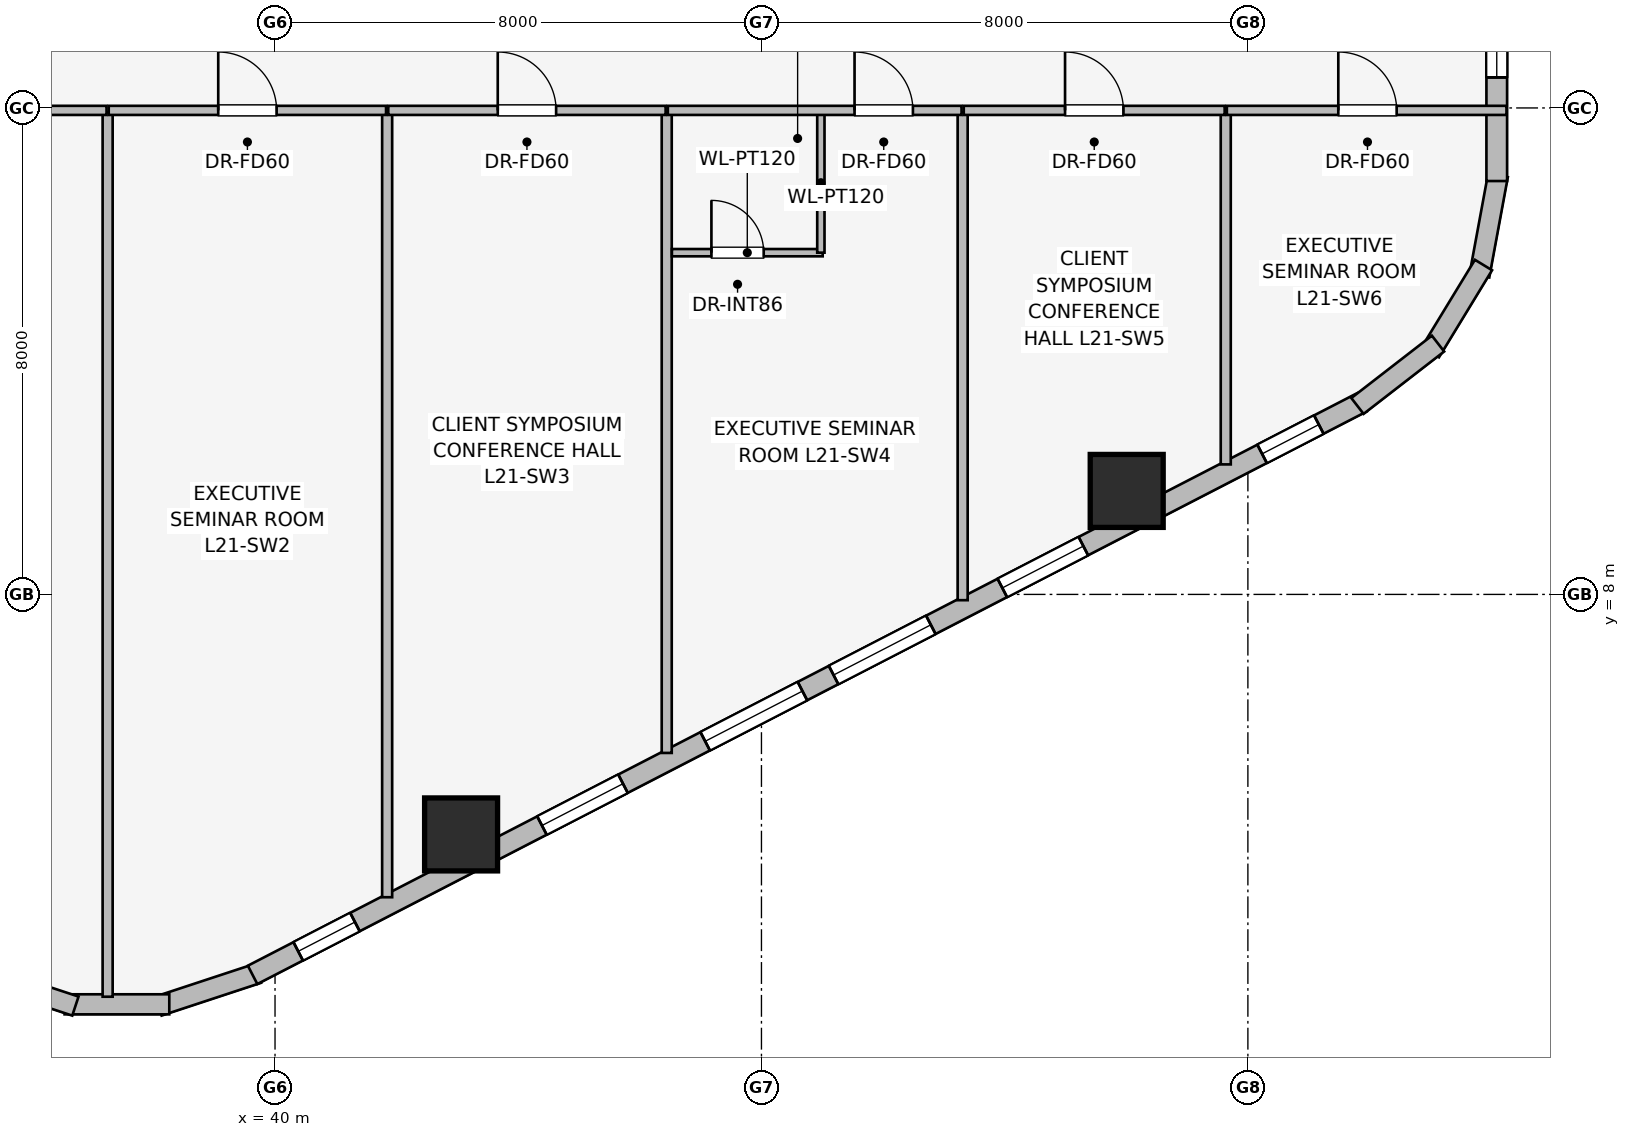
"""IFC4 building model, lengths in metres.
Left out: names, types, materials, properties, quantities, classifications, styles, units other than length and angle.
Written with IfcOpenShell. Run it as: python <this file> out.ifc"""

import sys

from ifc_helpers import new_model, si_unit, direction, frame, frame_2d, origin, origin_2d, place, context, subcontext, project, spatial, rectangle, extrude, element, fill, save


model = new_model("IFC4")
c1 = context("Model", 3, precision=1e-05, world=origin(), true_north=direction((0.0, 1.0)))
c2 = subcontext(c1, "Body", "Model", "MODEL_VIEW")
j1 = project(units=[si_unit("LENGTHUNIT", "METRE"), si_unit("PLANEANGLEUNIT", "RADIAN")], contexts=[c1])
p1 = place(None, origin())
s1 = spatial("IfcSite", under=j1, at=p1, CompositionType="ELEMENT")
p2 = place(p1, origin())
s2 = spatial("IfcBuilding", under=s1, at=p2, CompositionType="ELEMENT")
p3 = place(p2, frame((0.0, 0.0, 81.75)))
s3 = spatial("IfcBuildingStorey", under=s2, at=p3, CompositionType="ELEMENT", Elevation=81.75)
for number, where, z_axis, x_axis in (
    (1, (43.06, 4.053, 0.0), (0.0, 0.0, 1.0), (1.0, 0.0, 0.0)),
    (2, (54.007, 9.702, 0.0), (0.0, 0.0, 1.0), (1.0, 0.0, 0.0)),
):
    element("IfcColumn", number, at=place(p3, frame(where, z_axis=z_axis, x_axis=x_axis)), inside=s3, PredefinedType="COLUMN", context=c2, shape_type="SweptSolid", body=[
        extrude(rectangle(XDim=1.2, YDim=1.2, at=origin_2d()), origin(), (0.0, 0.0, 1.0), 3.65),
    ])
p4 = place(p3, frame((39.719, 1.769, 0.0), z_axis=(0.0, 0.0, 1.0), x_axis=(-0.94976901097, -0.312951794691, 0.0)))
e3 = element("IfcWall", 3, at=p4, inside=s3, PredefinedType="STANDARD", context=c2, shape_type="SweptSolid", body=[
    extrude(rectangle(XDim=1.722, YDim=0.33, at=frame_2d((0.861, 0.0))), origin(), (0.0, 0.0, 1.0), 3.39),
])
p5 = place(p3, frame((38.261, 1.259, 0.0), z_axis=(0.0, 0.0, 1.0), x_axis=(-1.0, 0.0, 0.0)))
e4 = element("IfcWall", 4, at=p5, inside=s3, PredefinedType="STANDARD", context=c2, shape_type="SweptSolid", body=[
    extrude(rectangle(XDim=1.722, YDim=0.33, at=frame_2d((0.861, 0.0))), origin(), (0.0, 0.0, 1.0), 3.39),
])
p6 = place(p3, frame((36.717, 1.23, 0.0), z_axis=(0.0, 0.0, 1.0), x_axis=(-0.94976901097, 0.312951794691, 0.0)))
e5 = element("IfcWall", 5, at=p6, inside=s3, PredefinedType="STANDARD", context=c2, shape_type="SweptSolid", body=[
    extrude(rectangle(XDim=1.722, YDim=0.33, at=frame_2d((0.861, 0.0))), origin(), (0.0, 0.0, 1.0), 3.39),
])
p7 = place(p3, frame((57.876, 11.159, 0.0), z_axis=(0.0, 0.0, 1.0), x_axis=(-0.888634413993, -0.458616264721, 0.0)))
e6 = element("IfcWall", 6, at=p7, inside=s3, PredefinedType="STANDARD", context=c2, shape_type="SweptSolid", body=[
    extrude(rectangle(XDim=20.531, YDim=0.34, at=frame_2d((10.266, 0.0))), origin(), (0.0, 0.0, 1.0), 2.684),
])
p8 = place(p7, frame((0.798, 0.0, 0.75)))
e7 = element("IfcOpeningElement", 7, at=p8, cuts=e6, PredefinedType="OPENING", context=c2, shape_type="SweptSolid", body=[
    extrude(rectangle(XDim=1.05, YDim=1.4, at=frame_2d((0.525, 0.7))), frame((0.0, 0.18, 0.0), z_axis=(0.0, -1.0, 0.0), x_axis=(1.0, 0.0, 0.0)), (0.0, 0.0, 1.0), 0.36),
])
p9 = place(p7, frame((5.156, 0.0, 0.75)))
e8 = element("IfcOpeningElement", 8, at=p9, cuts=e6, PredefinedType="OPENING", context=c2, shape_type="SweptSolid", body=[
    extrude(rectangle(XDim=1.5, YDim=1.5, at=frame_2d((0.75, 0.75))), frame((0.0, 0.18, 0.0), z_axis=(0.0, -1.0, 0.0), x_axis=(1.0, 0.0, 0.0)), (0.0, 0.0, 1.0), 0.36),
])
p10 = place(p7, frame((7.979, 0.0, 0.75)))
e9 = element("IfcOpeningElement", 9, at=p10, cuts=e6, PredefinedType="OPENING", context=c2, shape_type="SweptSolid", body=[
    extrude(rectangle(XDim=1.8, YDim=1.5, at=frame_2d((0.9, 0.75))), frame((0.0, 0.18, 0.0), z_axis=(0.0, -1.0, 0.0), x_axis=(1.0, 0.0, 0.0)), (0.0, 0.0, 1.0), 0.36),
])
p11 = place(p7, frame((10.355, 0.0, 0.75)))
e10 = element("IfcOpeningElement", 10, at=p11, cuts=e6, PredefinedType="OPENING", context=c2, shape_type="SweptSolid", body=[
    extrude(rectangle(XDim=1.8, YDim=1.5, at=frame_2d((0.9, 0.75))), frame((0.0, 0.18, 0.0), z_axis=(0.0, -1.0, 0.0), x_axis=(1.0, 0.0, 0.0)), (0.0, 0.0, 1.0), 0.36),
])
p12 = place(p7, frame((13.676, 0.0, 0.75)))
e11 = element("IfcOpeningElement", 11, at=p12, cuts=e6, PredefinedType="OPENING", context=c2, shape_type="SweptSolid", body=[
    extrude(rectangle(XDim=1.5, YDim=1.5, at=frame_2d((0.75, 0.75))), frame((0.0, 0.18, 0.0), z_axis=(0.0, -1.0, 0.0), x_axis=(1.0, 0.0, 0.0)), (0.0, 0.0, 1.0), 0.36),
])
p13 = place(p7, frame((18.637, 0.0, 0.75)))
e12 = element("IfcOpeningElement", 12, at=p13, cuts=e6, PredefinedType="OPENING", context=c2, shape_type="SweptSolid", body=[
    extrude(rectangle(XDim=1.05, YDim=1.4, at=frame_2d((0.525, 0.7))), frame((0.0, 0.18, 0.0), z_axis=(0.0, -1.0, 0.0), x_axis=(1.0, 0.0, 0.0)), (0.0, 0.0, 1.0), 0.36),
])
p14 = place(p3, frame((60.113, 14.892, 0.0), z_axis=(0.0, 0.0, 1.0), x_axis=(-0.181714143354, -0.983351397063, 0.0)))
e13 = element("IfcWall", 13, at=p14, inside=s3, PredefinedType="STANDARD", context=c2, shape_type="SweptSolid", body=[
    extrude(rectangle(XDim=1.678, YDim=0.33, at=frame_2d((0.839, 0.0))), origin(), (0.0, 0.0, 1.0), 3.39),
])
p15 = place(p3, frame((59.875, 13.417, 0.0), z_axis=(0.0, 0.0, 1.0), x_axis=(-0.520584129191, -0.853810379671, 0.0)))
e14 = element("IfcWall", 14, at=p15, inside=s3, PredefinedType="STANDARD", context=c2, shape_type="SweptSolid", body=[
    extrude(rectangle(XDim=1.677, YDim=0.33, at=frame_2d((0.838, 0.0))), origin(), (0.0, 0.0, 1.0), 3.39),
])
p16 = place(p3, frame((59.127, 12.125, 0.0), z_axis=(0.0, 0.0, 1.0), x_axis=(-0.790691856293, -0.61221433207, 0.0)))
e15 = element("IfcWall", 15, at=p16, inside=s3, PredefinedType="STANDARD", context=c2, shape_type="SweptSolid", body=[
    extrude(rectangle(XDim=1.676, YDim=0.33, at=frame_2d((0.838, 0.0))), origin(), (0.0, 0.0, 1.0), 3.39),
])
p17 = place(p3, frame((60.093, 33.202, 0.0), z_axis=(0.0, 0.0, 1.0), x_axis=(0.0, -1.0, 0.0)))
e16 = element("IfcWall", 16, at=p17, inside=s3, PredefinedType="STANDARD", context=c2, shape_type="SweptSolid", body=[
    extrude(rectangle(XDim=18.404, YDim=0.34, at=frame_2d((9.202, 0.0))), origin(), (0.0, 0.0, 1.0), 2.684),
])
p18 = place(p17, frame((1.744, 0.0, 0.75)))
e17 = element("IfcOpeningElement", 17, at=p18, cuts=e16, PredefinedType="OPENING", context=c2, shape_type="SweptSolid", body=[
    extrude(rectangle(XDim=1.05, YDim=1.4, at=frame_2d((0.525, 0.7))), frame((0.0, 0.18, 0.0), z_axis=(0.0, -1.0, 0.0), x_axis=(1.0, 0.0, 0.0)), (0.0, 0.0, 1.0), 0.36),
])
p19 = place(p17, frame((5.298, 0.0, 0.75)))
e18 = element("IfcOpeningElement", 18, at=p19, cuts=e16, PredefinedType="OPENING", context=c2, shape_type="SweptSolid", body=[
    extrude(rectangle(XDim=1.5, YDim=1.5, at=frame_2d((0.75, 0.75))), frame((0.0, 0.18, 0.0), z_axis=(0.0, -1.0, 0.0), x_axis=(1.0, 0.0, 0.0)), (0.0, 0.0, 1.0), 0.36),
])
p20 = place(p17, frame((8.793, 0.0, 0.75)))
e19 = element("IfcOpeningElement", 19, at=p20, cuts=e16, PredefinedType="OPENING", context=c2, shape_type="SweptSolid", body=[
    extrude(rectangle(XDim=1.05, YDim=1.4, at=frame_2d((0.525, 0.7))), frame((0.0, 0.18, 0.0), z_axis=(0.0, -1.0, 0.0), x_axis=(1.0, 0.0, 0.0)), (0.0, 0.0, 1.0), 0.36),
])
p21 = place(p17, frame((11.722, 0.0, 0.75)))
e20 = element("IfcOpeningElement", 20, at=p21, cuts=e16, PredefinedType="OPENING", context=c2, shape_type="SweptSolid", body=[
    extrude(rectangle(XDim=1.5, YDim=1.5, at=frame_2d((0.75, 0.75))), frame((0.0, 0.18, 0.0), z_axis=(0.0, -1.0, 0.0), x_axis=(1.0, 0.0, 0.0)), (0.0, 0.0, 1.0), 0.36),
])
p22 = place(p17, frame((15.65, 0.0, 0.75)))
e21 = element("IfcOpeningElement", 21, at=p22, cuts=e16, PredefinedType="OPENING", context=c2, shape_type="SweptSolid", body=[
    extrude(rectangle(XDim=1.05, YDim=1.4, at=frame_2d((0.525, 0.7))), frame((0.0, 0.18, 0.0), z_axis=(0.0, -1.0, 0.0), x_axis=(1.0, 0.0, 0.0)), (0.0, 0.0, 1.0), 0.36),
])
p23 = place(p3, frame((37.247, 1.384, 0.0), z_axis=(0.0, 0.0, 1.0), x_axis=(0.0, 1.0, 0.0)))
e22 = element("IfcWall", 22, at=p23, inside=s3, PredefinedType="PARTITIONING", context=c2, shape_type="SweptSolid", body=[
    extrude(rectangle(XDim=14.546, YDim=0.165, at=frame_2d((7.273, 0.0))), origin(), (0.0, 0.0, 1.0), 3.39),
])
p24 = place(p3, frame((41.844, 3.02, 0.0), z_axis=(0.0, 0.0, 1.0), x_axis=(0.0, 1.0, 0.0)))
e23 = element("IfcWall", 23, at=p24, inside=s3, PredefinedType="PARTITIONING", context=c2, shape_type="SweptSolid", body=[
    extrude(rectangle(XDim=12.91, YDim=0.165, at=frame_2d((6.455, 0.0))), origin(), (0.0, 0.0, 1.0), 2.513),
])
p25 = place(p3, frame((46.442, 5.393, 0.0), z_axis=(0.0, 0.0, 1.0), x_axis=(0.0, 1.0, 0.0)))
e24 = element("IfcWall", 24, at=p25, inside=s3, PredefinedType="PARTITIONING", context=c2, shape_type="SweptSolid", body=[
    extrude(rectangle(XDim=10.537, YDim=0.165, at=frame_2d((5.269, 0.0))), origin(), (0.0, 0.0, 1.0), 3.39),
])
p26 = place(p3, frame((51.309, 7.905, 0.0), z_axis=(0.0, 0.0, 1.0), x_axis=(0.0, 1.0, 0.0)))
e25 = element("IfcWall", 25, at=p26, inside=s3, PredefinedType="PARTITIONING", context=c2, shape_type="SweptSolid", body=[
    extrude(rectangle(XDim=8.025, YDim=0.165, at=frame_2d((4.012, 0.0))), origin(), (0.0, 0.0, 1.0), 3.39),
])
p27 = place(p3, frame((55.636, 10.138, 0.0), z_axis=(0.0, 0.0, 1.0), x_axis=(0.0, 1.0, 0.0)))
e26 = element("IfcWall", 26, at=p27, inside=s3, PredefinedType="PARTITIONING", context=c2, shape_type="SweptSolid", body=[
    extrude(rectangle(XDim=5.792, YDim=0.165, at=frame_2d((2.896, 0.0))), origin(), (0.0, 0.0, 1.0), 3.39),
])
p28 = place(p3, frame((32.85, 15.96, 0.0), z_axis=(0.0, 0.0, 1.0), x_axis=(1.0, 0.0, 0.0)))
e27 = element("IfcWall", 27, at=p28, inside=s3, PredefinedType="PARTITIONING", context=c2, shape_type="SweptSolid", body=[
    extrude(rectangle(XDim=4.379, YDim=0.15, at=frame_2d((2.189, 0.0))), origin(), (0.0, 0.0, 1.0), 3.39),
])
p29 = place(p28, frame((1.71, 0.0, 0.0)))
e28 = element("IfcOpeningElement", 28, at=p29, cuts=e27, PredefinedType="OPENING", context=c2, shape_type="SweptSolid", body=[
    extrude(rectangle(XDim=0.96, YDim=2.0, at=frame_2d((0.48, 1.0))), frame((0.0, 0.085, 0.0), z_axis=(0.0, -1.0, 0.0), x_axis=(1.0, 0.0, 0.0)), (0.0, 0.0, 1.0), 0.17),
])
p30 = place(p3, frame((37.265, 15.96, 0.0), z_axis=(0.0, 0.0, 1.0), x_axis=(1.0, 0.0, 0.0)))
e29 = element("IfcWall", 29, at=p30, inside=s3, PredefinedType="PARTITIONING", context=c2, shape_type="SweptSolid", body=[
    extrude(rectangle(XDim=4.561, YDim=0.15, at=frame_2d((2.281, 0.0))), origin(), (0.0, 0.0, 1.0), 3.39),
])
p31 = place(p30, frame((1.801, 0.0, 0.0)))
e30 = element("IfcOpeningElement", 30, at=p31, cuts=e29, PredefinedType="OPENING", context=c2, shape_type="SweptSolid", body=[
    extrude(rectangle(XDim=0.96, YDim=2.0, at=frame_2d((0.48, 1.0))), frame((0.0, 0.085, 0.0), z_axis=(0.0, -1.0, 0.0), x_axis=(1.0, 0.0, 0.0)), (0.0, 0.0, 1.0), 0.17),
])
p32 = place(p3, frame((41.862, 15.96, 0.0), z_axis=(0.0, 0.0, 1.0), x_axis=(1.0, 0.0, 0.0)))
e31 = element("IfcWall", 31, at=p32, inside=s3, PredefinedType="PARTITIONING", context=c2, shape_type="SweptSolid", body=[
    extrude(rectangle(XDim=4.562, YDim=0.15, at=frame_2d((2.281, 0.0))), origin(), (0.0, 0.0, 1.0), 3.39),
])
p33 = place(p32, frame((1.801, 0.0, 0.0)))
e32 = element("IfcOpeningElement", 32, at=p33, cuts=e31, PredefinedType="OPENING", context=c2, shape_type="SweptSolid", body=[
    extrude(rectangle(XDim=0.96, YDim=2.0, at=frame_2d((0.48, 1.0))), frame((0.0, 0.085, 0.0), z_axis=(0.0, -1.0, 0.0), x_axis=(1.0, 0.0, 0.0)), (0.0, 0.0, 1.0), 0.17),
])
p34 = place(p3, frame((46.527, 13.62, 0.0), z_axis=(0.0, 0.0, 1.0), x_axis=(1.0, 0.0, 0.0)))
e33 = element("IfcWall", 33, at=p34, inside=s3, PredefinedType="PARTITIONING", context=c2, shape_type="SweptSolid", body=[
    extrude(rectangle(XDim=2.48, YDim=0.12, at=frame_2d((1.24, 0.0))), origin(), (0.0, 0.0, 1.0), 3.39),
])
p35 = place(p34, frame((0.65, 0.0, 0.0)))
e34 = element("IfcOpeningElement", 34, at=p35, cuts=e33, PredefinedType="OPENING", context=c2, shape_type="SweptSolid", body=[
    extrude(rectangle(XDim=0.86, YDim=2.0, at=frame_2d((0.43, 1.0))), frame((0.0, 0.07, 0.0), z_axis=(0.0, -1.0, 0.0), x_axis=(1.0, 0.0, 0.0)), (0.0, 0.0, 1.0), 0.14),
])
p36 = place(p3, frame((48.977, 13.62, 0.0), z_axis=(0.0, 0.0, 1.0), x_axis=(0.0, 1.0, 0.0)))
e35 = element("IfcWall", 35, at=p36, inside=s3, PredefinedType="PARTITIONING", context=c2, shape_type="SweptSolid", body=[
    extrude(rectangle(XDim=2.3, YDim=0.12, at=frame_2d((1.15, 0.0))), origin(), (0.0, 0.0, 1.0), 3.39),
])
p37 = place(p3, frame((46.46, 15.96, 0.0), z_axis=(0.0, 0.0, 1.0), x_axis=(1.0, 0.0, 0.0)))
e36 = element("IfcWall", 36, at=p37, inside=s3, PredefinedType="PARTITIONING", context=c2, shape_type="SweptSolid", body=[
    extrude(rectangle(XDim=4.831, YDim=0.15, at=frame_2d((2.416, 0.0))), origin(), (0.0, 0.0, 1.0), 3.39),
])
p38 = place(p37, frame((3.071, 0.0, 0.0)))
e37 = element("IfcOpeningElement", 37, at=p38, cuts=e36, PredefinedType="OPENING", context=c2, shape_type="SweptSolid", body=[
    extrude(rectangle(XDim=0.96, YDim=2.0, at=frame_2d((0.48, 1.0))), frame((0.0, 0.085, 0.0), z_axis=(0.0, -1.0, 0.0), x_axis=(1.0, 0.0, 0.0)), (0.0, 0.0, 1.0), 0.17),
])
p39 = place(p3, frame((51.327, 15.96, 0.0), z_axis=(0.0, 0.0, 1.0), x_axis=(1.0, 0.0, 0.0)))
e38 = element("IfcWall", 38, at=p39, inside=s3, PredefinedType="PARTITIONING", context=c2, shape_type="SweptSolid", body=[
    extrude(rectangle(XDim=4.291, YDim=0.15, at=frame_2d((2.146, 0.0))), origin(), (0.0, 0.0, 1.0), 3.39),
])
p40 = place(p39, frame((1.666, 0.0, 0.0)))
e39 = element("IfcOpeningElement", 39, at=p40, cuts=e38, PredefinedType="OPENING", context=c2, shape_type="SweptSolid", body=[
    extrude(rectangle(XDim=0.96, YDim=2.0, at=frame_2d((0.48, 1.0))), frame((0.0, 0.085, 0.0), z_axis=(0.0, -1.0, 0.0), x_axis=(1.0, 0.0, 0.0)), (0.0, 0.0, 1.0), 0.17),
])
p41 = place(p3, frame((55.654, 15.96, 0.0), z_axis=(0.0, 0.0, 1.0), x_axis=(1.0, 0.0, 0.0)))
e40 = element("IfcWall", 40, at=p41, inside=s3, PredefinedType="PARTITIONING", context=c2, shape_type="SweptSolid", body=[
    extrude(rectangle(XDim=4.599, YDim=0.15, at=frame_2d((2.299, 0.0))), origin(), (0.0, 0.0, 1.0), 3.39),
])
p42 = place(p41, frame((1.833, 0.0, 0.0)))
e41 = element("IfcOpeningElement", 41, at=p42, cuts=e40, PredefinedType="OPENING", context=c2, shape_type="SweptSolid", body=[
    extrude(rectangle(XDim=0.96, YDim=2.0, at=frame_2d((0.48, 1.0))), frame((0.0, 0.085, 0.0), z_axis=(0.0, -1.0, 0.0), x_axis=(1.0, 0.0, 0.0)), (0.0, 0.0, 1.0), 0.17),
])
p43 = place(p8, origin())
e42 = element("IfcWindow", 42, at=p43, inside=s3, PartitioningType="SINGLE_PANEL", PredefinedType="WINDOW", context=c2, shape_type="SweptSolid", body=[
    extrude(rectangle(XDim=1.05, YDim=1.4, at=frame_2d((0.525, 0.7))), frame((0.0, 0.03, 0.0), z_axis=(0.0, -1.0, 0.0), x_axis=(1.0, 0.0, 0.0)), (0.0, 0.0, 1.0), 0.06),
])
fill(e7, e42)
p44 = place(p9, origin())
e43 = element("IfcWindow", 43, at=p44, inside=s3, PartitioningType="SINGLE_PANEL", PredefinedType="WINDOW", context=c2, shape_type="SweptSolid", body=[
    extrude(rectangle(XDim=1.5, YDim=1.5, at=frame_2d((0.75, 0.75))), frame((0.0, 0.03, 0.0), z_axis=(0.0, -1.0, 0.0), x_axis=(1.0, 0.0, 0.0)), (0.0, 0.0, 1.0), 0.06),
])
fill(e8, e43)
p45 = place(p10, origin())
e44 = element("IfcWindow", 44, at=p45, inside=s3, PartitioningType="SINGLE_PANEL", PredefinedType="WINDOW", context=c2, shape_type="SweptSolid", body=[
    extrude(rectangle(XDim=1.8, YDim=1.5, at=frame_2d((0.9, 0.75))), frame((0.0, 0.03, 0.0), z_axis=(0.0, -1.0, 0.0), x_axis=(1.0, 0.0, 0.0)), (0.0, 0.0, 1.0), 0.06),
])
fill(e9, e44)
p46 = place(p11, origin())
e45 = element("IfcWindow", 45, at=p46, inside=s3, PartitioningType="SINGLE_PANEL", PredefinedType="WINDOW", context=c2, shape_type="SweptSolid", body=[
    extrude(rectangle(XDim=1.8, YDim=1.5, at=frame_2d((0.9, 0.75))), frame((0.0, 0.03, 0.0), z_axis=(0.0, -1.0, 0.0), x_axis=(1.0, 0.0, 0.0)), (0.0, 0.0, 1.0), 0.06),
])
fill(e10, e45)
p47 = place(p12, origin())
e46 = element("IfcWindow", 46, at=p47, inside=s3, PartitioningType="SINGLE_PANEL", PredefinedType="WINDOW", context=c2, shape_type="SweptSolid", body=[
    extrude(rectangle(XDim=1.5, YDim=1.5, at=frame_2d((0.75, 0.75))), frame((0.0, 0.03, 0.0), z_axis=(0.0, -1.0, 0.0), x_axis=(1.0, 0.0, 0.0)), (0.0, 0.0, 1.0), 0.06),
])
fill(e11, e46)
p48 = place(p13, origin())
e47 = element("IfcWindow", 47, at=p48, inside=s3, PartitioningType="SINGLE_PANEL", PredefinedType="WINDOW", context=c2, shape_type="SweptSolid", body=[
    extrude(rectangle(XDim=1.05, YDim=1.4, at=frame_2d((0.525, 0.7))), frame((0.0, 0.03, 0.0), z_axis=(0.0, -1.0, 0.0), x_axis=(1.0, 0.0, 0.0)), (0.0, 0.0, 1.0), 0.06),
])
fill(e12, e47)
p49 = place(p22, origin())
e48 = element("IfcWindow", 48, at=p49, inside=s3, PartitioningType="SINGLE_PANEL", PredefinedType="WINDOW", context=c2, shape_type="SweptSolid", body=[
    extrude(rectangle(XDim=1.05, YDim=1.4, at=frame_2d((0.525, 0.7))), frame((0.0, 0.03, 0.0), z_axis=(0.0, -1.0, 0.0), x_axis=(1.0, 0.0, 0.0)), (0.0, 0.0, 1.0), 0.06),
])
fill(e21, e48)
p50 = place(p31, origin())
e49 = element("IfcDoor", 49, at=p50, inside=s3, OperationType="SINGLE_SWING_LEFT", PredefinedType="DOOR", context=c2, shape_type="SweptSolid", body=[
    extrude(rectangle(XDim=0.96, YDim=2.0, at=frame_2d((0.48, 1.0))), frame((0.0, 0.025, 0.0), z_axis=(0.0, -1.0, 0.0), x_axis=(1.0, 0.0, 0.0)), (0.0, 0.0, 1.0), 0.05),
])
fill(e30, e49)
p51 = place(p33, origin())
e50 = element("IfcDoor", 50, at=p51, inside=s3, OperationType="SINGLE_SWING_LEFT", PredefinedType="DOOR", context=c2, shape_type="SweptSolid", body=[
    extrude(rectangle(XDim=0.96, YDim=2.0, at=frame_2d((0.48, 1.0))), frame((0.0, 0.025, 0.0), z_axis=(0.0, -1.0, 0.0), x_axis=(1.0, 0.0, 0.0)), (0.0, 0.0, 1.0), 0.05),
])
fill(e32, e50)
p52 = place(p35, origin())
e51 = element("IfcDoor", 51, at=p52, inside=s3, OperationType="SINGLE_SWING_LEFT", PredefinedType="DOOR", context=c2, shape_type="SweptSolid", body=[
    extrude(rectangle(XDim=0.86, YDim=2.0, at=frame_2d((0.43, 1.0))), frame((0.0, 0.025, 0.0), z_axis=(0.0, -1.0, 0.0), x_axis=(1.0, 0.0, 0.0)), (0.0, 0.0, 1.0), 0.05),
])
fill(e34, e51)
p53 = place(p38, origin())
e52 = element("IfcDoor", 52, at=p53, inside=s3, OperationType="SINGLE_SWING_LEFT", PredefinedType="DOOR", context=c2, shape_type="SweptSolid", body=[
    extrude(rectangle(XDim=0.96, YDim=2.0, at=frame_2d((0.48, 1.0))), frame((0.0, 0.025, 0.0), z_axis=(0.0, -1.0, 0.0), x_axis=(1.0, 0.0, 0.0)), (0.0, 0.0, 1.0), 0.05),
])
fill(e37, e52)
p54 = place(p40, origin())
e53 = element("IfcDoor", 53, at=p54, inside=s3, OperationType="SINGLE_SWING_LEFT", PredefinedType="DOOR", context=c2, shape_type="SweptSolid", body=[
    extrude(rectangle(XDim=0.96, YDim=2.0, at=frame_2d((0.48, 1.0))), frame((0.0, 0.025, 0.0), z_axis=(0.0, -1.0, 0.0), x_axis=(1.0, 0.0, 0.0)), (0.0, 0.0, 1.0), 0.05),
])
fill(e39, e53)
p55 = place(p42, origin())
e54 = element("IfcDoor", 54, at=p55, inside=s3, OperationType="SINGLE_SWING_LEFT", PredefinedType="DOOR", context=c2, shape_type="SweptSolid", body=[
    extrude(rectangle(XDim=0.96, YDim=2.0, at=frame_2d((0.48, 1.0))), frame((0.0, 0.025, 0.0), z_axis=(0.0, -1.0, 0.0), x_axis=(1.0, 0.0, 0.0)), (0.0, 0.0, 1.0), 0.05),
])
fill(e41, e54)
save(model, sys.argv[1])
